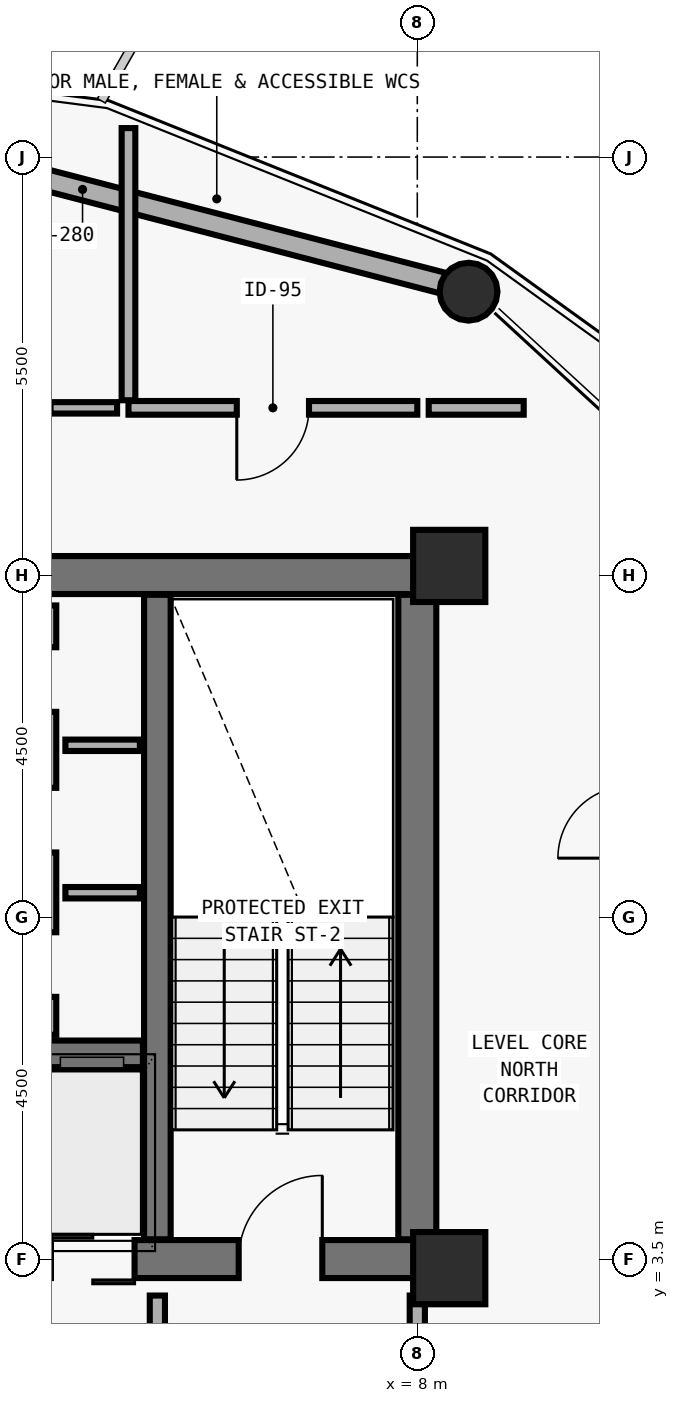
"""IFC4 building model, lengths in metres.
Left out: names, types, materials, properties, quantities, classifications, styles, units other than length and angle.
Written with IfcOpenShell. Run it as: python <this file> out.ifc"""

import sys

from ifc_helpers import new_model, si_unit, direction, frame, frame_2d, origin, origin_2d, place, context, subcontext, project, spatial, rectangle, hollow_circle, extrude, element, fill, save


model = new_model("IFC4")
c1 = context("Model", 3, precision=1e-05, world=origin(), true_north=direction((0.0, 1.0)))
c2 = subcontext(c1, "Body", "Model", "MODEL_VIEW")
j1 = project(units=[si_unit("LENGTHUNIT", "METRE"), si_unit("PLANEANGLEUNIT", "RADIAN")], contexts=[c1])
p1 = place(None, origin())
s1 = spatial("IfcSite", under=j1, at=p1, CompositionType="ELEMENT")
p2 = place(p1, origin())
s2 = spatial("IfcBuilding", under=s1, at=p2, CompositionType="ELEMENT")
p3 = place(p2, frame((0.0, 0.0, 165.6)))
s3 = spatial("IfcBuildingStorey", under=s2, at=p3, CompositionType="ELEMENT", Elevation=165.6)
p4 = place(p3, frame((-2.0, 3.5, 0.0), z_axis=(0.0, 0.0, 1.0), x_axis=(1.0, 0.0, 0.0)))
e1 = element("IfcWall", 1, at=p4, inside=s3, PredefinedType="SHEAR", context=c2, shape_type="SweptSolid", body=[
    extrude(rectangle(XDim=10.0, YDim=0.5, at=frame_2d((5.0, 0.0))), origin(), (0.0, 0.0, 1.0), 3.892),
])
p5 = place(p4, frame((1.65, 0.0, 0.0)))
e2 = element("IfcOpeningElement", 2, at=p5, cuts=e1, PredefinedType="OPENING", context=c2, shape_type="SweptSolid", body=[
    extrude(rectangle(XDim=1.1, YDim=2.15, at=frame_2d((0.55, 1.075))), frame((0.0, 0.26, 0.0), z_axis=(0.0, -1.0, 0.0), x_axis=(1.0, 0.0, 0.0)), (0.0, 0.0, 1.0), 0.52),
])
p6 = place(p4, frame((7.65, 0.0, 0.0)))
e3 = element("IfcOpeningElement", 3, at=p6, cuts=e1, PredefinedType="OPENING", context=c2, shape_type="SweptSolid", body=[
    extrude(rectangle(XDim=1.1, YDim=2.15, at=frame_2d((0.55, 1.075))), frame((0.0, 0.26, 0.0), z_axis=(0.0, -1.0, 0.0), x_axis=(1.0, 0.0, 0.0)), (0.0, 0.0, 1.0), 0.52),
])
p7 = place(p4, frame((3.72, 0.0, 0.0)))
e4 = element("IfcOpeningElement", 4, at=p7, cuts=e1, PredefinedType="OPENING", context=c2, shape_type="SweptSolid", body=[
    extrude(rectangle(XDim=1.1, YDim=2.2, at=frame_2d((0.55, 1.1))), frame((0.0, 0.26, 0.0), z_axis=(0.0, -1.0, 0.0), x_axis=(1.0, 0.0, 0.0)), (0.0, 0.0, 1.0), 0.52),
])
p8 = place(p4, frame((5.18, 0.0, 0.0)))
e5 = element("IfcOpeningElement", 5, at=p8, cuts=e1, PredefinedType="OPENING", context=c2, shape_type="SweptSolid", body=[
    extrude(rectangle(XDim=1.1, YDim=2.2, at=frame_2d((0.55, 1.1))), frame((0.0, 0.26, 0.0), z_axis=(0.0, -1.0, 0.0), x_axis=(1.0, 0.0, 0.0)), (0.0, 0.0, 1.0), 0.52),
])
p9 = place(p3, frame((-2.0, 12.5, 0.0), z_axis=(0.0, 0.0, 1.0), x_axis=(1.0, 0.0, 0.0)))
e6 = element("IfcWall", 6, at=p9, inside=s3, PredefinedType="SHEAR", context=c2, shape_type="SweptSolid", body=[
    extrude(rectangle(XDim=10.0, YDim=0.5, at=frame_2d((5.0, 0.0))), origin(), (0.0, 0.0, 1.0), 3.892),
])
p10 = place(p9, frame((3.92, 0.0, 0.0)))
e7 = element("IfcOpeningElement", 7, at=p10, cuts=e6, PredefinedType="OPENING", context=c2, shape_type="SweptSolid", body=[
    extrude(rectangle(XDim=0.85, YDim=2.1, at=frame_2d((0.425, 1.05))), frame((0.0, 0.26, 0.0), z_axis=(0.0, -1.0, 0.0), x_axis=(1.0, 0.0, 0.0)), (0.0, 0.0, 1.0), 0.52),
])
p11 = place(p3, frame((8.0, 3.76, 0.0), z_axis=(0.0, 0.0, 1.0), x_axis=(0.0, 1.0, 0.0)))
e8 = element("IfcWall", 8, at=p11, inside=s3, PredefinedType="SHEAR", context=c2, shape_type="SweptSolid", body=[
    extrude(rectangle(XDim=8.48, YDim=0.5, at=frame_2d((4.24, 0.0))), origin(), (0.0, 0.0, 1.0), 3.892),
])
p12 = place(p3, frame((4.58, 3.76, 0.0), z_axis=(0.0, 0.0, 1.0), x_axis=(0.0, 1.0, 0.0)))
e9 = element("IfcWall", 9, at=p12, inside=s3, PredefinedType="SHEAR", context=c2, shape_type="SweptSolid", body=[
    extrude(rectangle(XDim=8.48, YDim=0.35, at=frame_2d((4.24, 0.0))), origin(), (0.0, 0.0, 1.0), 3.892),
])
p13 = place(p3, frame((1.61, 6.2, 0.0), z_axis=(0.0, 0.0, 1.0), x_axis=(1.0, 0.0, 0.0)))
e10 = element("IfcWall", 10, at=p13, inside=s3, PredefinedType="SHEAR", context=c2, shape_type="SweptSolid", body=[
    extrude(rectangle(XDim=2.78, YDim=0.35, at=frame_2d((1.39, 0.0))), origin(), (0.0, 0.0, 1.0), 3.892),
])
for number, where, z_axis, x_axis in (
    (11, (8.42, 12.62, 0.0), (0.0, 0.0, 1.0), (1.0, 0.0, 0.0)),
    (12, (8.42, 3.38, 0.0), (0.0, 0.0, 1.0), (1.0, 0.0, 0.0)),
):
    element("IfcColumn", number, at=place(p3, frame(where, z_axis=z_axis, x_axis=x_axis)), inside=s3, PredefinedType="COLUMN", context=c2, shape_type="SweptSolid", body=[
        extrude(rectangle(XDim=0.95, YDim=0.95, at=origin_2d()), origin(), (0.0, 0.0, 1.0), 3.875),
    ])
p14 = place(p3, frame((8.691, 16.249, 0.0), z_axis=(-0.009693839824, -0.012028852336, 0.99988066097), x_axis=(0.77862958397, -0.627483841199, 0.0)))
e13 = element("IfcColumn", 13, at=p14, inside=s3, PredefinedType="COLUMN", context=c2, shape_type="SweptSolid", body=[
    extrude(hollow_circle(Radius=0.381, WallThickness=0.028, at=origin_2d()), origin(), (0.0, 0.0, 1.0), 3.45),
])
p15 = place(p3, frame((-1.175, 18.813, 0.0), z_axis=(0.0, 0.0, 1.0), x_axis=(0.967842287651, -0.251557759242, 0.0)))
e14 = element("IfcWall", 14, at=p15, inside=s3, PredefinedType="SOLIDWALL", context=c2, shape_type="SweptSolid", body=[
    extrude(rectangle(XDim=9.857, YDim=0.28, at=frame_2d((4.929, 0.0))), origin(), (0.0, 0.0, 1.0), 2.97),
])
p16 = place(p3, frame((3.15, 6.45, 0.0), z_axis=(0.0, 0.0, 1.0), x_axis=(0.0, 1.0, 0.0)))
e15 = element("IfcWall", 15, at=p16, inside=s3, PredefinedType="MOVABLE", context=c2, shape_type="SweptSolid", body=[
    extrude(rectangle(XDim=5.65, YDim=0.2, at=frame_2d((2.825, 0.0))), origin(), (0.0, 0.0, 1.0), 3.45),
])
p17 = place(p16, frame((0.5, 0.0, 0.0)))
e16 = element("IfcOpeningElement", 16, at=p17, cuts=e15, PredefinedType="OPENING", context=c2, shape_type="SweptSolid", body=[
    extrude(rectangle(XDim=0.85, YDim=2.1, at=frame_2d((0.425, 1.05))), frame((0.0, 0.11, 0.0), z_axis=(0.0, -1.0, 0.0), x_axis=(1.0, 0.0, 0.0)), (0.0, 0.0, 1.0), 0.22),
])
p18 = place(p16, frame((2.4, 0.0, 0.0)))
e17 = element("IfcOpeningElement", 17, at=p18, cuts=e15, PredefinedType="OPENING", context=c2, shape_type="SweptSolid", body=[
    extrude(rectangle(XDim=0.85, YDim=2.1, at=frame_2d((0.425, 1.05))), frame((0.0, 0.11, 0.0), z_axis=(0.0, -1.0, 0.0), x_axis=(1.0, 0.0, 0.0)), (0.0, 0.0, 1.0), 0.22),
])
p19 = place(p16, frame((4.25, 0.0, 0.0)))
e18 = element("IfcOpeningElement", 18, at=p19, cuts=e15, PredefinedType="OPENING", context=c2, shape_type="SweptSolid", body=[
    extrude(rectangle(XDim=0.85, YDim=2.1, at=frame_2d((0.425, 1.05))), frame((0.0, 0.11, 0.0), z_axis=(0.0, -1.0, 0.0), x_axis=(1.0, 0.0, 0.0)), (0.0, 0.0, 1.0), 0.22),
])
p20 = place(p3, frame((4.58, 0.83, 0.0), z_axis=(0.0, 0.0, 1.0), x_axis=(0.0, 1.0, 0.0)))
e19 = element("IfcWall", 19, at=p20, inside=s3, PredefinedType="MOVABLE", context=c2, shape_type="SweptSolid", body=[
    extrude(rectangle(XDim=2.19, YDim=0.2, at=frame_2d((1.095, 0.0))), origin(), (0.0, 0.0, 1.0), 3.45),
])
p21 = place(p20, frame((0.66, 0.0, 0.0)))
e20 = element("IfcOpeningElement", 20, at=p21, cuts=e19, PredefinedType="OPENING", context=c2, shape_type="SweptSolid", body=[
    extrude(rectangle(XDim=1.0, YDim=2.1, at=frame_2d((0.5, 1.05))), frame((0.0, 0.11, 0.0), z_axis=(0.0, -1.0, 0.0), x_axis=(1.0, 0.0, 0.0)), (0.0, 0.0, 1.0), 0.22),
])
p22 = place(p3, frame((8.0, 0.72, 0.0), z_axis=(0.0, 0.0, 1.0), x_axis=(0.0, 1.0, 0.0)))
e21 = element("IfcWall", 21, at=p22, inside=s3, PredefinedType="MOVABLE", context=c2, shape_type="SweptSolid", body=[
    extrude(rectangle(XDim=2.3, YDim=0.2, at=frame_2d((1.15, 0.0))), origin(), (0.0, 0.0, 1.0), 2.782),
])
p23 = place(p22, frame((0.845, 0.0, 0.0)))
e22 = element("IfcOpeningElement", 22, at=p23, cuts=e21, PredefinedType="OPENING", context=c2, shape_type="SweptSolid", body=[
    extrude(rectangle(XDim=0.85, YDim=2.1, at=frame_2d((0.425, 1.05))), frame((0.0, 0.11, 0.0), z_axis=(0.0, -1.0, 0.0), x_axis=(1.0, 0.0, 0.0)), (0.0, 0.0, 1.0), 0.22),
])
p24 = place(p3, frame((8.0, 14.7, 0.0), z_axis=(0.0, 0.0, 1.0), x_axis=(-1.0, 0.0, 0.0)))
e23 = element("IfcWall", 23, at=p24, inside=s3, PredefinedType="PLUMBINGWALL", context=c2, shape_type="SweptSolid", body=[
    extrude(rectangle(XDim=3.8, YDim=0.18, at=frame_2d((1.9, 0.0))), origin(), (0.0, 0.0, 1.0), 3.032),
])
p25 = place(p24, frame((1.425, 0.0, 0.0)))
e24 = element("IfcOpeningElement", 24, at=p25, cuts=e23, PredefinedType="OPENING", context=c2, shape_type="SweptSolid", body=[
    extrude(rectangle(XDim=0.95, YDim=2.1, at=frame_2d((0.475, 1.05))), frame((0.0, 0.1, 0.0), z_axis=(0.0, -1.0, 0.0), x_axis=(1.0, 0.0, 0.0)), (0.0, 0.0, 1.0), 0.2),
])
p26 = place(p3, frame((4.05, 14.7, 0.0), z_axis=(0.0, 0.0, 1.0), x_axis=(-1.0, 0.0, 0.0)))
e25 = element("IfcWall", 25, at=p26, inside=s3, PredefinedType="PARTITIONING", context=c2, shape_type="SweptSolid", body=[
    extrude(rectangle(XDim=2.85, YDim=0.15, at=frame_2d((1.425, 0.0))), origin(), (0.0, 0.0, 1.0), 3.032),
])
p27 = place(p26, frame((0.875, 0.0, 0.0)))
e26 = element("IfcOpeningElement", 26, at=p27, cuts=e25, PredefinedType="OPENING", context=c2, shape_type="SweptSolid", body=[
    extrude(rectangle(XDim=0.95, YDim=2.1, at=frame_2d((0.475, 1.05))), frame((0.0, 0.085, 0.0), z_axis=(0.0, -1.0, 0.0), x_axis=(1.0, 0.0, 0.0)), (0.0, 0.0, 1.0), 0.17),
])
for number, where, z_axis, x_axis in (
    (27, (3.37, 8.32, 0.0), (0.0, 0.0, 1.0), (1.0, 0.0, 0.0)),
    (28, (3.37, 10.26, 0.0), (0.0, 0.0, 1.0), (1.0, 0.0, 0.0)),
):
    element("IfcWall", number, at=place(p3, frame(where, z_axis=z_axis, x_axis=x_axis)), inside=s3, PredefinedType="PARTITIONING", context=c2, shape_type="SweptSolid", body=[
        extrude(rectangle(XDim=0.98, YDim=0.15, at=frame_2d((0.49, 0.0))), origin(), (0.0, 0.0, 1.0), 3.45),
    ])
p28 = place(p3, frame((9.4, 14.7, 0.0), z_axis=(0.0, 0.0, 1.0), x_axis=(-1.0, 0.0, 0.0)))
e29 = element("IfcWall", 29, at=p28, inside=s3, PredefinedType="PLUMBINGWALL", context=c2, shape_type="SweptSolid", body=[
    extrude(rectangle(XDim=1.25, YDim=0.18, at=frame_2d((0.625, 0.0))), origin(), (0.0, 0.0, 1.0), 3.032),
])
p29 = place(p3, frame((4.2, 18.381, 0.0), z_axis=(0.0, 0.0, 1.0), x_axis=(0.0, -1.0, 0.0)))
e30 = element("IfcWall", 30, at=p29, inside=s3, PredefinedType="PLUMBINGWALL", context=c2, shape_type="SweptSolid", body=[
    extrude(rectangle(XDim=3.581, YDim=0.18, at=frame_2d((1.791, 0.0))), origin(), (0.0, 0.0, 1.0), 3.45),
])
p30 = place(p6, origin())
e31 = element("IfcDoor", 31, at=p30, inside=s3, OperationType="SINGLE_SWING_RIGHT", PredefinedType="DOOR", context=c2, shape_type="SweptSolid", body=[
    extrude(rectangle(XDim=1.1, YDim=2.15, at=frame_2d((0.55, 1.075))), frame((0.0, 0.025, 0.0), z_axis=(0.0, -1.0, 0.0), x_axis=(1.0, 0.0, 0.0)), (0.0, 0.0, 1.0), 0.05),
])
fill(e3, e31)
p31 = place(p8, origin())
e32 = element("IfcDoor", 32, at=p31, inside=s3, OperationType="DOUBLE_DOOR_SLIDING", PredefinedType="DOOR", context=c2, shape_type="SweptSolid", body=[
    extrude(rectangle(XDim=1.1, YDim=2.2, at=frame_2d((0.55, 1.1))), frame((0.0, 0.025, 0.0), z_axis=(0.0, -1.0, 0.0), x_axis=(1.0, 0.0, 0.0)), (0.0, 0.0, 1.0), 0.05),
])
fill(e5, e32)
p32 = place(p25, origin())
e33 = element("IfcDoor", 33, at=p32, inside=s3, OperationType="SINGLE_SWING_RIGHT", PredefinedType="DOOR", context=c2, shape_type="SweptSolid", body=[
    extrude(rectangle(XDim=0.95, YDim=2.1, at=frame_2d((0.475, 1.05))), frame((0.0, 0.025, 0.0), z_axis=(0.0, -1.0, 0.0), x_axis=(1.0, 0.0, 0.0)), (0.0, 0.0, 1.0), 0.05),
])
fill(e24, e33)
save(model, sys.argv[1])
